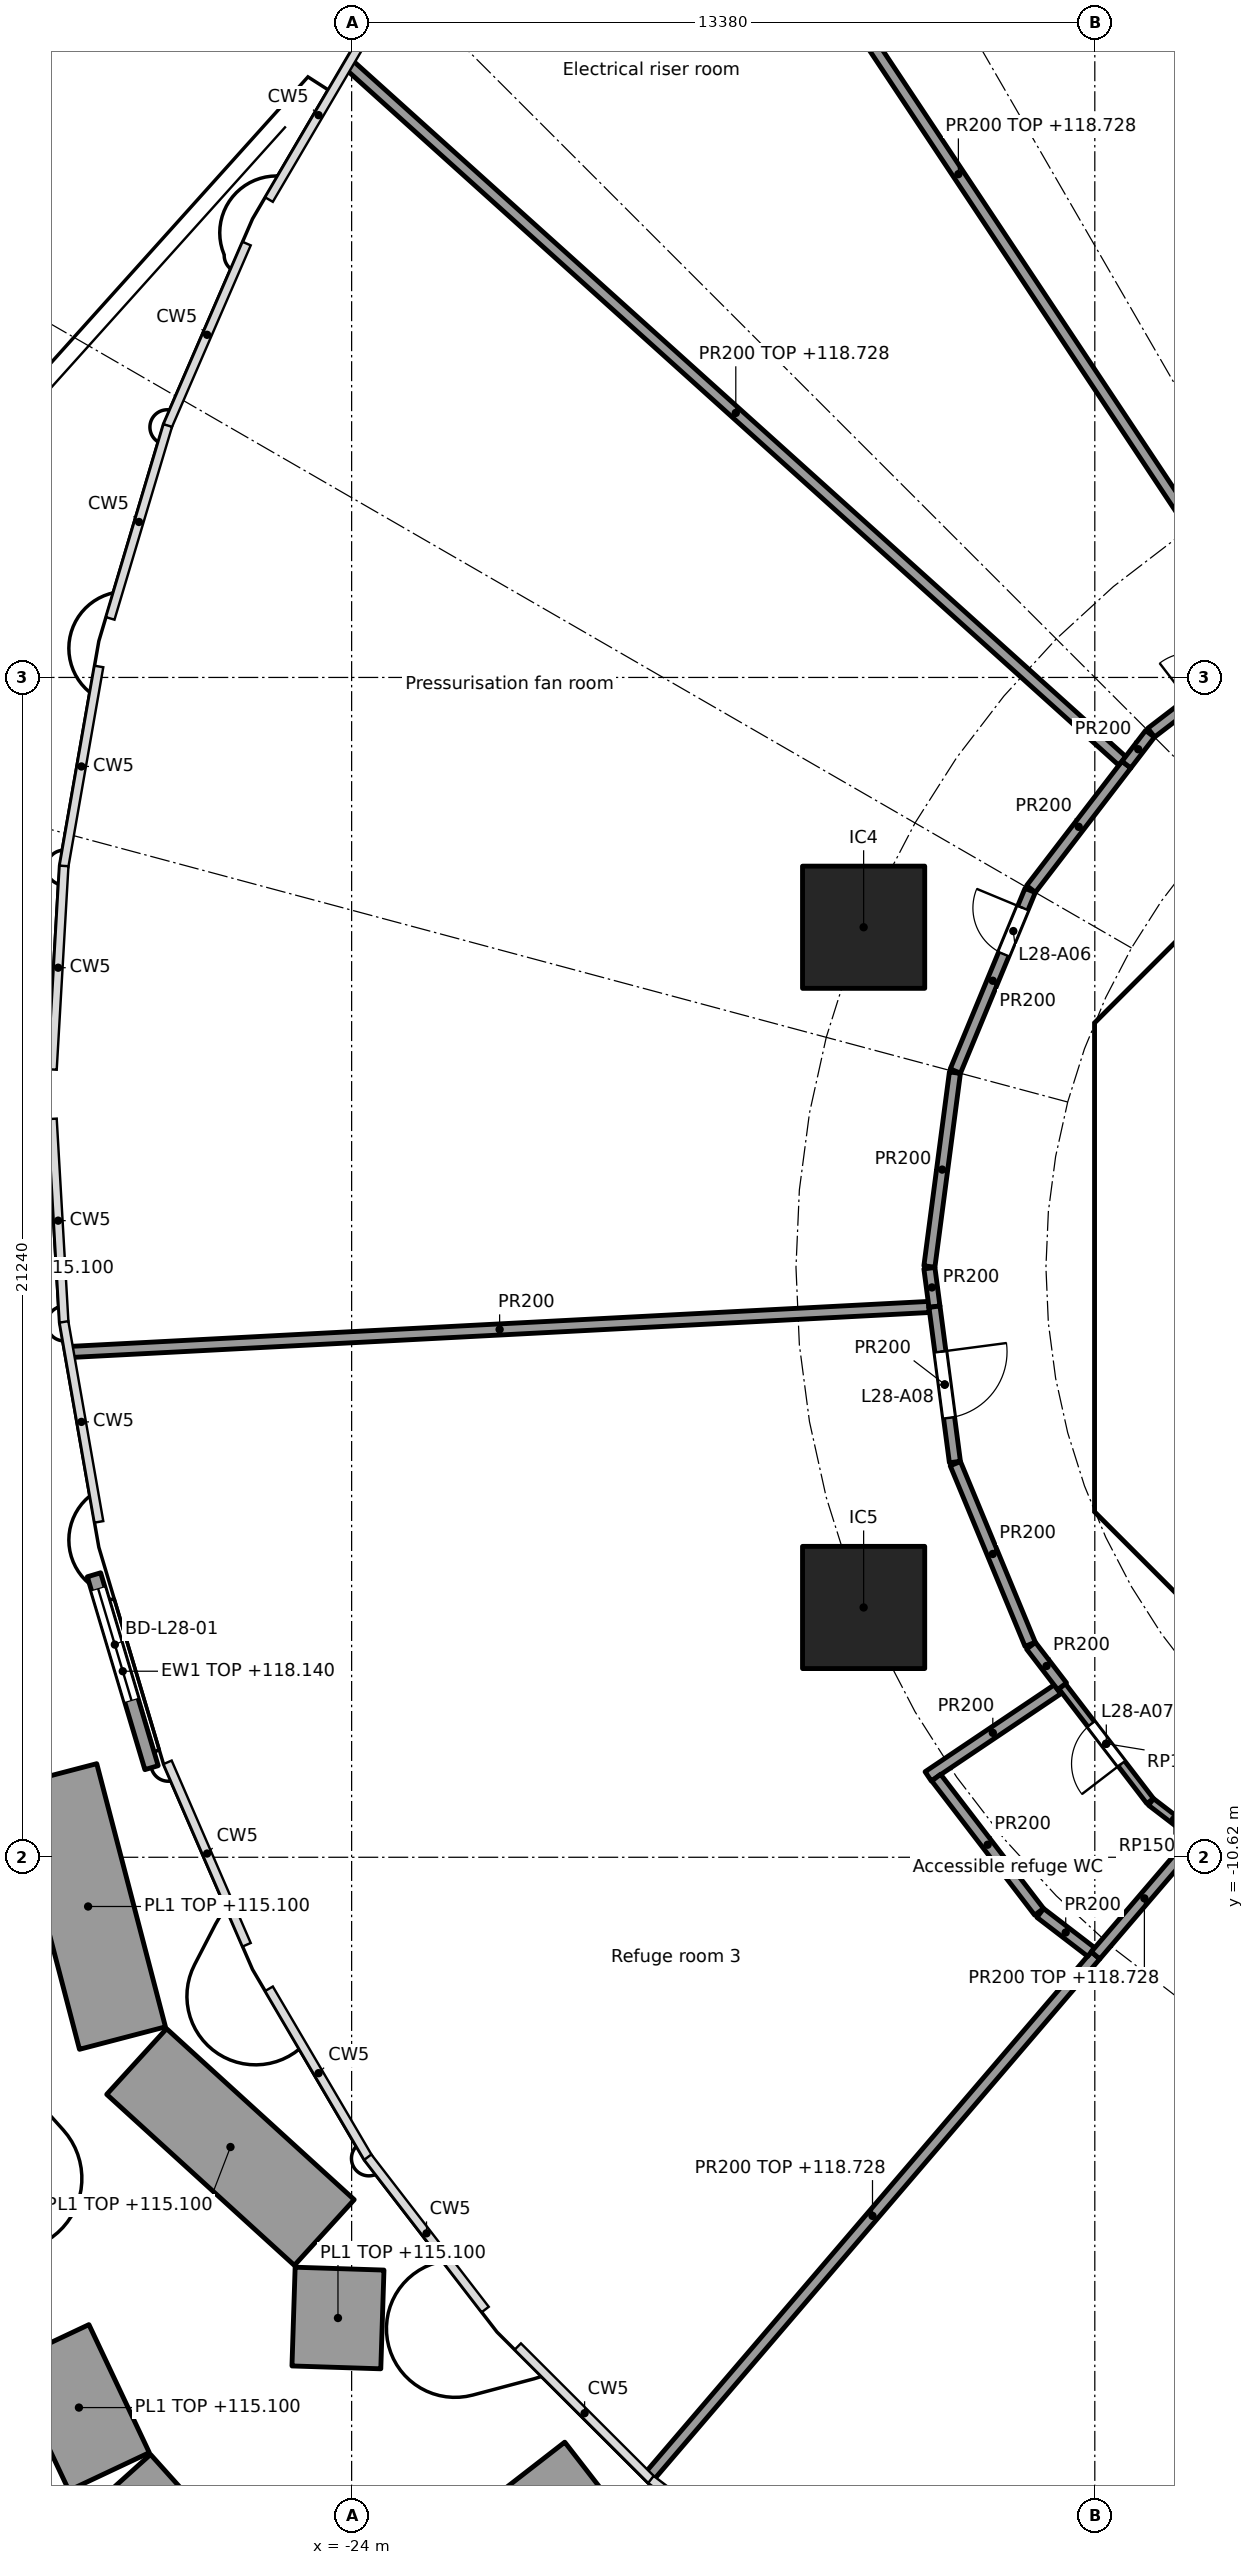
"""IFC4 building model, lengths in metres.
Left out: names, types, materials, properties, quantities, classifications, styles, units other than length and angle.
Written with IfcOpenShell. Run it as: python <this file> out.ifc"""

import sys

from ifc_helpers import new_model, si_unit, direction, frame, frame_2d, origin, origin_2d, place, context, subcontext, project, spatial, polyline, rectangle, outline, extrude, element, fill, save


model = new_model("IFC4")
c1 = context("Model", 3, precision=1e-05, world=origin(), true_north=direction((0.0, 1.0)))
c2 = subcontext(c1, "Body", "Model", "MODEL_VIEW")
j1 = project(units=[si_unit("LENGTHUNIT", "METRE"), si_unit("PLANEANGLEUNIT", "RADIAN")], contexts=[c1])
p1 = place(None, origin())
s1 = spatial("IfcSite", under=j1, at=p1, CompositionType="ELEMENT")
p2 = place(p1, origin())
s2 = spatial("IfcBuilding", under=s1, at=p2, CompositionType="ELEMENT")
p3 = place(p2, frame((0.0, 0.0, 114.0)))
s3 = spatial("IfcBuildingStorey", under=s2, at=p3, CompositionType="ELEMENT", Elevation=114.0)
for number, where, z_axis, x_axis in (
    (1, (-14.782, 6.123, 0.0), (0.0, 0.0, 1.0), (1.0, 0.0, 0.0)),
    (2, (-14.782, -6.123, 0.0), (0.0, 0.0, 1.0), (1.0, 0.0, 0.0)),
):
    element("IfcColumn", number, at=place(p3, frame(where, z_axis=z_axis, x_axis=x_axis)), inside=s3, PredefinedType="COLUMN", context=c2, shape_type="SweptSolid", body=[
        extrude(rectangle(XDim=2.2, YDim=2.2, at=origin_2d()), origin(), (0.0, 0.0, 1.0), 5.6),
    ])
p4 = place(p3, frame((-27.603, -9.007, 0.0), z_axis=(0.0, 0.0, 1.0), x_axis=(-0.285808378069, 0.95828678955, 0.0)))
e3 = element("IfcWall", 3, at=p4, inside=s3, PredefinedType="SOLIDWALL", context=c2, shape_type="SweptSolid", body=[
    extrude(rectangle(XDim=3.624, YDim=0.25, at=frame_2d((1.812, 0.0))), origin(), (0.0, 0.0, 1.0), 4.14),
])
p5 = place(p4, frame((1.262, 0.0, 0.0)))
e4 = element("IfcOpeningElement", 4, at=p5, cuts=e3, PredefinedType="OPENING", context=c2, shape_type="SweptSolid", body=[
    extrude(rectangle(XDim=2.1, YDim=2.4, at=frame_2d((1.05, 1.2))), frame((0.0, 0.135, 0.0), z_axis=(0.0, -1.0, 0.0), x_axis=(1.0, 0.0, 0.0)), (0.0, 0.0, 1.0), 0.27),
])
p6 = place(p3, frame((-29.363, -9.137, 0.0), z_axis=(0.0, 0.0, 1.0), x_axis=(0.252622817758, -0.967564836044, 0.0)))
e5 = element("IfcWall", 5, at=p6, inside=s3, PredefinedType="SOLIDWALL", context=c2, shape_type="SweptSolid", body=[
    extrude(rectangle(XDim=4.897, YDim=1.6, at=frame_2d((2.448, 0.0))), origin(), (0.0, 0.0, 1.0), 1.1),
])
p7 = place(p3, frame((-28.366, -21.679, 0.0), z_axis=(0.0, 0.0, 1.0), x_axis=(-0.426512189352, 0.904481814264, 0.0)))
e6 = element("IfcWall", 6, at=p7, inside=s3, PredefinedType="SOLIDWALL", context=c2, shape_type="SweptSolid", body=[
    extrude(rectangle(XDim=2.548, YDim=1.6, at=frame_2d((1.274, 0.0))), origin(), (0.0, 0.0, 1.0), 1.1),
])
p8 = place(p3, frame((-27.871, -14.297, 0.0), z_axis=(0.0, 0.0, 1.0), x_axis=(0.739195155337, -0.67349129343, 0.0)))
e7 = element("IfcWall", 7, at=p8, inside=s3, PredefinedType="SOLIDWALL", context=c2, shape_type="SweptSolid", body=[
    extrude(rectangle(XDim=4.57, YDim=1.6, at=frame_2d((2.285, 0.0))), origin(), (0.0, 0.0, 1.0), 1.1),
])
p9 = place(p3, frame((-24.217, -18.026, 0.0), z_axis=(0.0, 0.0, 1.0), x_axis=(-0.032258988147, -0.999479543404, 0.0)))
e8 = element("IfcWall", 8, at=p9, inside=s3, PredefinedType="SOLIDWALL", context=c2, shape_type="SweptSolid", body=[
    extrude(rectangle(XDim=1.779, YDim=1.6, at=frame_2d((0.889, 0.0))), origin(), (0.0, 0.0, 1.0), 1.1),
])
p10 = place(p3, frame((-22.337, -28.448, 0.0), z_axis=(0.0, 0.0, 1.0), x_axis=(-0.668392521247, 0.743808737204, 0.0)))
e9 = element("IfcWall", 9, at=p10, inside=s3, PredefinedType="SOLIDWALL", context=c2, shape_type="SweptSolid", body=[
    extrude(rectangle(XDim=8.796, YDim=1.6, at=frame_2d((4.398, 0.0))), origin(), (0.0, 0.0, 1.0), 1.1),
])
p11 = place(p3, frame((-20.795, -21.64, 0.0), z_axis=(0.0, 0.0, 1.0), x_axis=(0.61315518922, -0.789962476281, 0.0)))
e10 = element("IfcWall", 10, at=p11, inside=s3, PredefinedType="SOLIDWALL", context=c2, shape_type="SweptSolid", body=[
    extrude(rectangle(XDim=6.415, YDim=1.6, at=frame_2d((3.208, 0.0))), origin(), (0.0, 0.0, 1.0), 1.1),
])
p12 = place(p3, frame((-4.613, 9.988, 0.0), z_axis=(0.0, 0.0, 1.0), x_axis=(-0.707106781187, -0.707106781187, 0.0)))
e11 = element("IfcWall", 11, at=p12, inside=s3, PredefinedType="SHEAR", context=c2, shape_type="SweptSolid", body=[
    extrude(rectangle(XDim=7.602, YDim=0.6, at=frame_2d((3.801, 0.0))), origin(), (0.0, 0.0, 1.0), 5.34),
])
p13 = place(p12, frame((0.351, 0.0, 0.0)))
e12 = element("IfcOpeningElement", 12, at=p13, cuts=e11, PredefinedType="OPENING", context=c2, shape_type="SweptSolid", body=[
    extrude(rectangle(XDim=1.1, YDim=2.1, at=frame_2d((0.55, 1.05))), frame((0.0, 0.31, 0.0), z_axis=(0.0, -1.0, 0.0), x_axis=(1.0, 0.0, 0.0)), (0.0, 0.0, 1.0), 0.62),
])
p14 = place(p3, frame((-10.325, 3.801, 0.0), z_axis=(0.0, 0.0, 1.0), x_axis=(0.0, -1.0, 0.0)))
e13 = element("IfcWall", 13, at=p14, inside=s3, PredefinedType="SHEAR", context=c2, shape_type="SweptSolid", body=[
    extrude(rectangle(XDim=7.602, YDim=0.6, at=frame_2d((3.801, 0.0))), origin(), (0.0, 0.0, 1.0), 5.34),
])
p15 = place(p14, frame((0.651, 0.0, 0.0)))
e14 = element("IfcOpeningElement", 14, at=p15, cuts=e13, PredefinedType="OPENING", context=c2, shape_type="SweptSolid", body=[
    extrude(rectangle(XDim=1.5, YDim=2.1, at=frame_2d((0.75, 1.05))), frame((0.0, 0.31, 0.0), z_axis=(0.0, -1.0, 0.0), x_axis=(1.0, 0.0, 0.0)), (0.0, 0.0, 1.0), 0.62),
])
p16 = place(p14, frame((5.451, 0.0, 0.0)))
e15 = element("IfcOpeningElement", 15, at=p16, cuts=e13, PredefinedType="OPENING", context=c2, shape_type="SweptSolid", body=[
    extrude(rectangle(XDim=1.5, YDim=2.1, at=frame_2d((0.75, 1.05))), frame((0.0, 0.31, 0.0), z_axis=(0.0, -1.0, 0.0), x_axis=(1.0, 0.0, 0.0)), (0.0, 0.0, 1.0), 0.62),
])
p17 = place(p3, frame((-9.988, -4.613, 0.0), z_axis=(0.0, 0.0, 1.0), x_axis=(0.707106781187, -0.707106781187, 0.0)))
e16 = element("IfcWall", 16, at=p17, inside=s3, PredefinedType="SHEAR", context=c2, shape_type="SweptSolid", body=[
    extrude(rectangle(XDim=7.602, YDim=0.6, at=frame_2d((3.801, 0.0))), origin(), (0.0, 0.0, 1.0), 5.34),
])
p18 = place(p17, frame((6.151, 0.0, 0.0)))
e17 = element("IfcOpeningElement", 17, at=p18, cuts=e16, PredefinedType="OPENING", context=c2, shape_type="SweptSolid", body=[
    extrude(rectangle(XDim=1.1, YDim=2.1, at=frame_2d((0.55, 1.05))), frame((0.0, 0.31, 0.0), z_axis=(0.0, -1.0, 0.0), x_axis=(1.0, 0.0, 0.0)), (0.0, 0.0, 1.0), 0.62),
])
p19 = place(p3, origin())
e18 = element("IfcWall", 18, at=p19, inside=s3, PredefinedType="SHEAR", context=c2, shape_type="SweptSolid", body=[
    extrude(outline(polyline([(-10.625, -3.801), (-10.025, -3.801), (-10.025, -4.152), (-9.776, -4.401), (-10.2, -4.825), (-10.625, -4.401), (-10.625, -3.801)])), origin(), (0.0, 0.0, 1.0), 5.34),
])
p20 = place(p3, origin())
e19 = element("IfcWall", 19, at=p20, inside=s3, PredefinedType="SHEAR", context=c2, shape_type="SweptSolid", body=[
    extrude(outline(polyline([(-10.2, 4.825), (-9.776, 4.401), (-10.025, 4.152), (-10.025, 3.801), (-10.625, 3.801), (-10.625, 4.401), (-10.2, 4.825)])), origin(), (0.0, 0.0, 1.0), 5.34),
])
for number, where, z_axis, x_axis in (
    (20, (-10.025, -4.0, 0.0), (0.0, 0.0, 1.0), (1.0, 0.0, 0.0)),
    (21, (-10.025, 4.0, 0.0), (0.0, 0.0, 1.0), (1.0, 0.0, 0.0)),
):
    element("IfcWall", number, at=place(p3, frame(where, z_axis=z_axis, x_axis=x_axis)), inside=s3, PredefinedType="PARTITIONING", context=c2, shape_type="SweptSolid", body=[
        extrude(rectangle(XDim=3.325, YDim=0.2, at=frame_2d((1.662, 0.0))), origin(), (0.0, 0.0, 1.0), 5.34),
    ])
p21 = place(p3, frame((-9.624, -9.607, 0.0), z_axis=(0.0, 0.0, 1.0), x_axis=(-0.608709012517, 0.793393558129, 0.0)))
e22 = element("IfcWall", 22, at=p21, inside=s3, PredefinedType="PARTITIONING", context=c2, shape_type="SweptSolid", body=[
    extrude(rectangle(XDim=2.604, YDim=0.15, at=frame_2d((1.302, 0.0))), origin(), (0.0, 0.0, 1.0), 5.34),
])
p22 = place(p21, frame((0.846, 0.0, 0.0)))
e23 = element("IfcOpeningElement", 23, at=p22, cuts=e22, PredefinedType="OPENING", context=c2, shape_type="SweptSolid", body=[
    extrude(rectangle(XDim=0.9, YDim=2.1, at=frame_2d((0.45, 1.05))), frame((0.0, 0.085, 0.0), z_axis=(0.0, -1.0, 0.0), x_axis=(1.0, 0.0, 0.0)), (0.0, 0.0, 1.0), 0.17),
])
p23 = place(p3, frame((-8.783, -10.257, 0.0), z_axis=(0.0, 0.0, 1.0), x_axis=(-0.793296129213, 0.608835980684, 0.0)))
e24 = element("IfcWall", 24, at=p23, inside=s3, PredefinedType="PARTITIONING", context=c2, shape_type="SweptSolid", body=[
    extrude(rectangle(XDim=1.039, YDim=0.15, at=frame_2d((0.52, 0.0))), origin(), (0.0, 0.0, 1.0), 5.34),
])
p24 = place(p3, frame((-13.598, 0.015, 0.0), z_axis=(0.0, 0.0, 1.0), x_axis=(0.130468866457, 0.991452406768, 0.0)))
e25 = element("IfcWall", 25, at=p24, inside=s3, PredefinedType="PARTITIONING", context=c2, shape_type="SweptSolid", body=[
    extrude(rectangle(XDim=3.52, YDim=0.2, at=frame_2d((1.76, 0.0))), origin(), (0.0, 0.0, 1.0), 5.34),
])
p25 = place(p3, frame((-13.62, -9.163, 0.0), z_axis=(0.0, 0.0, 1.0), x_axis=(0.829713316312, 0.558189764089, 0.0)))
e26 = element("IfcWall", 26, at=p25, inside=s3, PredefinedType="PARTITIONING", context=c2, shape_type="SweptSolid", body=[
    extrude(rectangle(XDim=2.805, YDim=0.2, at=frame_2d((1.403, 0.0))), origin(), (0.0, 0.0, 1.0), 5.34),
])
p26 = place(p3, frame((-13.607, -0.713, 0.0), z_axis=(0.0, 0.0, 1.0), x_axis=(-0.99862965522, -0.05233365758, 0.0)))
e27 = element("IfcWall", 27, at=p26, inside=s3, PredefinedType="PARTITIONING", context=c2, shape_type="SweptSolid", body=[
    extrude(rectangle(XDim=15.479, YDim=0.2, at=frame_2d((7.739, 0.0))), origin(), (0.0, 0.0, 1.0), 5.34),
])
p27 = place(p3, frame((-13.507, -0.708, 0.0), z_axis=(0.0, 0.0, 1.0), x_axis=(-0.130309917135, 0.991473310532, 0.0)))
e28 = element("IfcWall", 28, at=p27, inside=s3, PredefinedType="PARTITIONING", context=c2, shape_type="SweptSolid", body=[
    extrude(rectangle(XDim=0.699, YDim=0.2, at=frame_2d((0.349, 0.0))), origin(), (0.0, 0.0, 1.0), 5.34),
])
p28 = place(p3, frame((-13.139, -3.505, 0.0), z_axis=(0.0, 0.0, 1.0), x_axis=(-0.130508241489, 0.991447224467, 0.0)))
e29 = element("IfcWall", 29, at=p28, inside=s3, PredefinedType="PARTITIONING", context=c2, shape_type="SweptSolid", body=[
    extrude(rectangle(XDim=2.821, YDim=0.2, at=frame_2d((1.411, 0.0))), origin(), (0.0, 0.0, 1.0), 5.34),
])
p29 = place(p28, frame((0.803, 0.0, 0.0)))
e30 = element("IfcOpeningElement", 30, at=p29, cuts=e29, PredefinedType="OPENING", context=c2, shape_type="SweptSolid", body=[
    extrude(rectangle(XDim=1.2, YDim=2.1, at=frame_2d((0.6, 1.05))), frame((0.0, 0.11, 0.0), z_axis=(0.0, -1.0, 0.0), x_axis=(1.0, 0.0, 0.0)), (0.0, 0.0, 1.0), 0.22),
])
p30 = place(p3, frame((-13.131, 3.534, 0.0), z_axis=(0.0, 0.0, 1.0), x_axis=(0.382723413813, 0.92386297064, 0.0)))
e31 = element("IfcWall", 31, at=p30, inside=s3, PredefinedType="PARTITIONING", context=c2, shape_type="SweptSolid", body=[
    extrude(rectangle(XDim=3.52, YDim=0.2, at=frame_2d((1.76, 0.0))), origin(), (0.0, 0.0, 1.0), 5.34),
])
p31 = place(p30, frame((2.278, 0.0, 0.0)))
e32 = element("IfcOpeningElement", 32, at=p31, cuts=e31, PredefinedType="OPENING", context=c2, shape_type="SweptSolid", body=[
    extrude(rectangle(XDim=0.9, YDim=2.1, at=frame_2d((0.45, 1.05))), frame((0.0, 0.11, 0.0), z_axis=(0.0, -1.0, 0.0), x_axis=(1.0, 0.0, 0.0)), (0.0, 0.0, 1.0), 0.22),
])
p32 = place(p3, frame((-11.784, -6.786, 0.0), z_axis=(0.0, 0.0, 1.0), x_axis=(-0.382723413813, 0.92386297064, 0.0)))
e33 = element("IfcWall", 33, at=p32, inside=s3, PredefinedType="PARTITIONING", context=c2, shape_type="SweptSolid", body=[
    extrude(rectangle(XDim=3.52, YDim=0.2, at=frame_2d((1.76, 0.0))), origin(), (0.0, 0.0, 1.0), 5.34),
])
p33 = place(p3, frame((-11.769, 6.812, 0.0), z_axis=(0.0, 0.0, 1.0), x_axis=(0.608714921409, 0.793389024662, 0.0)))
e34 = element("IfcWall", 34, at=p33, inside=s3, PredefinedType="PARTITIONING", context=c2, shape_type="SweptSolid", body=[
    extrude(rectangle(XDim=2.821, YDim=0.2, at=frame_2d((1.411, 0.0))), origin(), (0.0, 0.0, 1.0), 5.34),
])
p34 = place(p3, frame((-11.623, -11.602, 0.0), z_axis=(0.0, 0.0, 1.0), x_axis=(-0.608791787862, 0.793330044201, 0.0)))
e35 = element("IfcWall", 35, at=p34, inside=s3, PredefinedType="PARTITIONING", context=c2, shape_type="SweptSolid", body=[
    extrude(rectangle(XDim=3.044, YDim=0.2, at=frame_2d((1.522, 0.0))), origin(), (0.0, 0.0, 1.0), 5.34),
])
p35 = place(p3, frame((-11.209, -7.541, 0.0), z_axis=(0.0, 0.0, 1.0), x_axis=(-0.608721561765, 0.793383929912, 0.0)))
e36 = element("IfcWall", 36, at=p35, inside=s3, PredefinedType="PARTITIONING", context=c2, shape_type="SweptSolid", body=[
    extrude(rectangle(XDim=0.919, YDim=0.2, at=frame_2d((0.459, 0.0))), origin(), (0.0, 0.0, 1.0), 5.34),
])
p36 = place(p3, frame((-10.607, -12.386, 0.0), z_axis=(0.0, 0.0, 1.0), x_axis=(-0.650437966539, -0.75955937996, 0.0)))
e37 = element("IfcWall", 37, at=p36, inside=s3, PredefinedType="PARTITIONING", context=c2, shape_type="SweptSolid", body=[
    extrude(rectangle(XDim=12.348, YDim=0.2, at=frame_2d((6.174, 0.0))), origin(), (0.0, 0.0, 1.0), 4.728),
])
p37 = place(p3, frame((-10.686, -12.325, 0.0), z_axis=(0.0, 0.0, 1.0), x_axis=(-0.793299821517, 0.608831169687, 0.0)))
e38 = element("IfcWall", 38, at=p37, inside=s3, PredefinedType="PARTITIONING", context=c2, shape_type="SweptSolid", body=[
    extrude(rectangle(XDim=1.154, YDim=0.2, at=frame_2d((0.577, 0.0))), origin(), (0.0, 0.0, 1.0), 5.34),
])
p38 = place(p3, frame((-10.126, 9.117, 0.0), z_axis=(0.0, 0.0, 1.0), x_axis=(-0.743152798172, 0.669121751679, 0.0)))
e39 = element("IfcWall", 39, at=p38, inside=s3, PredefinedType="PARTITIONING", context=c2, shape_type="SweptSolid", body=[
    extrude(rectangle(XDim=18.725, YDim=0.2, at=frame_2d((9.363, 0.0))), origin(), (0.0, 0.0, 1.0), 4.728),
])
p39 = place(p3, frame((-10.051, 9.05, 0.0), z_axis=(0.0, 0.0, 1.0), x_axis=(0.608629566887, 0.793454504248, 0.0)))
e40 = element("IfcWall", 40, at=p39, inside=s3, PredefinedType="PARTITIONING", context=c2, shape_type="SweptSolid", body=[
    extrude(rectangle(XDim=0.699, YDim=0.2, at=frame_2d((0.349, 0.0))), origin(), (0.0, 0.0, 1.0), 5.34),
])
p40 = place(p3, frame((-9.605, 9.626, 0.0), z_axis=(0.0, 0.0, 1.0), x_axis=(0.793412701193, 0.608684060564, 0.0)))
e41 = element("IfcWall", 41, at=p40, inside=s3, PredefinedType="PARTITIONING", context=c2, shape_type="SweptSolid", body=[
    extrude(rectangle(XDim=2.679, YDim=0.2, at=frame_2d((1.339, 0.0))), origin(), (0.0, 0.0, 1.0), 5.34),
])
p41 = place(p40, frame((0.882, 0.0, 0.0)))
e42 = element("IfcOpeningElement", 42, at=p41, cuts=e41, PredefinedType="OPENING", context=c2, shape_type="SweptSolid", body=[
    extrude(rectangle(XDim=0.9, YDim=2.1, at=frame_2d((0.45, 1.05))), frame((0.0, 0.11, 0.0), z_axis=(0.0, -1.0, 0.0), x_axis=(1.0, 0.0, 0.0)), (0.0, 0.0, 1.0), 0.22),
])
p42 = place(p3, frame((-8.848, -10.333, 0.0), z_axis=(0.0, 0.0, 1.0), x_axis=(-0.650412043265, -0.759581578223, 0.0)))
e43 = element("IfcWall", 43, at=p42, inside=s3, PredefinedType="PARTITIONING", context=c2, shape_type="SweptSolid", body=[
    extrude(rectangle(XDim=2.704, YDim=0.2, at=frame_2d((1.352, 0.0))), origin(), (0.0, 0.0, 1.0), 4.728),
])
p43 = place(p3, frame((-7.535, 11.34, 0.0), z_axis=(0.0, 0.0, 1.0), x_axis=(-0.553405443997, 0.832912008891, 0.0)))
e44 = element("IfcWall", 44, at=p43, inside=s3, PredefinedType="PARTITIONING", context=c2, shape_type="SweptSolid", body=[
    extrude(rectangle(XDim=20.027, YDim=0.2, at=frame_2d((10.013, 0.0))), origin(), (0.0, 0.0, 1.0), 4.728),
])
p44 = place(p5, origin())
e45 = element("IfcDoor", 45, at=p44, inside=s3, OperationType="SLIDING_TO_LEFT", PredefinedType="DOOR", context=c2, shape_type="SweptSolid", body=[
    extrude(rectangle(XDim=2.1, YDim=2.4, at=frame_2d((1.05, 1.2))), frame((0.0, 0.025, 0.0), z_axis=(0.0, -1.0, 0.0), x_axis=(1.0, 0.0, 0.0)), (0.0, 0.0, 1.0), 0.05),
])
fill(e4, e45)
p45 = place(p15, origin())
e46 = element("IfcDoor", 46, at=p45, inside=s3, OperationType="DOUBLE_DOOR_SINGLE_SWING", PredefinedType="DOOR", context=c2, shape_type="SweptSolid", body=[
    extrude(rectangle(XDim=1.5, YDim=2.1, at=frame_2d((0.75, 1.05))), frame((0.0, 0.025, 0.0), z_axis=(0.0, -1.0, 0.0), x_axis=(1.0, 0.0, 0.0)), (0.0, 0.0, 1.0), 0.05),
])
fill(e14, e46)
p46 = place(p16, origin())
e47 = element("IfcDoor", 47, at=p46, inside=s3, OperationType="DOUBLE_DOOR_SINGLE_SWING", PredefinedType="DOOR", context=c2, shape_type="SweptSolid", body=[
    extrude(rectangle(XDim=1.5, YDim=2.1, at=frame_2d((0.75, 1.05))), frame((0.0, 0.025, 0.0), z_axis=(0.0, -1.0, 0.0), x_axis=(1.0, 0.0, 0.0)), (0.0, 0.0, 1.0), 0.05),
])
fill(e15, e47)
p47 = place(p31, origin())
e48 = element("IfcDoor", 48, at=p47, inside=s3, OperationType="SINGLE_SWING_RIGHT", PredefinedType="DOOR", context=c2, shape_type="SweptSolid", body=[
    extrude(rectangle(XDim=0.9, YDim=2.1, at=frame_2d((0.45, 1.05))), frame((0.0, 0.025, 0.0), z_axis=(0.0, -1.0, 0.0), x_axis=(1.0, 0.0, 0.0)), (0.0, 0.0, 1.0), 0.05),
])
fill(e32, e48)
p48 = place(p22, origin())
e49 = element("IfcDoor", 49, at=p48, inside=s3, OperationType="SINGLE_SWING_LEFT", PredefinedType="DOOR", context=c2, shape_type="SweptSolid", body=[
    extrude(rectangle(XDim=0.9, YDim=2.1, at=frame_2d((0.45, 1.05))), frame((0.0, 0.025, 0.0), z_axis=(0.0, -1.0, 0.0), x_axis=(1.0, 0.0, 0.0)), (0.0, 0.0, 1.0), 0.05),
])
fill(e23, e49)
p49 = place(p29, frame((1.2, 0.0, 0.0), x_axis=(-1.0, 0.0, 0.0)))
e50 = element("IfcDoor", 50, at=p49, inside=s3, OperationType="SINGLE_SWING_LEFT", PredefinedType="DOOR", context=c2, shape_type="SweptSolid", body=[
    extrude(rectangle(XDim=1.2, YDim=2.1, at=frame_2d((0.6, 1.05))), frame((0.0, 0.025, 0.0), z_axis=(0.0, -1.0, 0.0), x_axis=(1.0, 0.0, 0.0)), (0.0, 0.0, 1.0), 0.05),
])
fill(e30, e50)
save(model, sys.argv[1])
